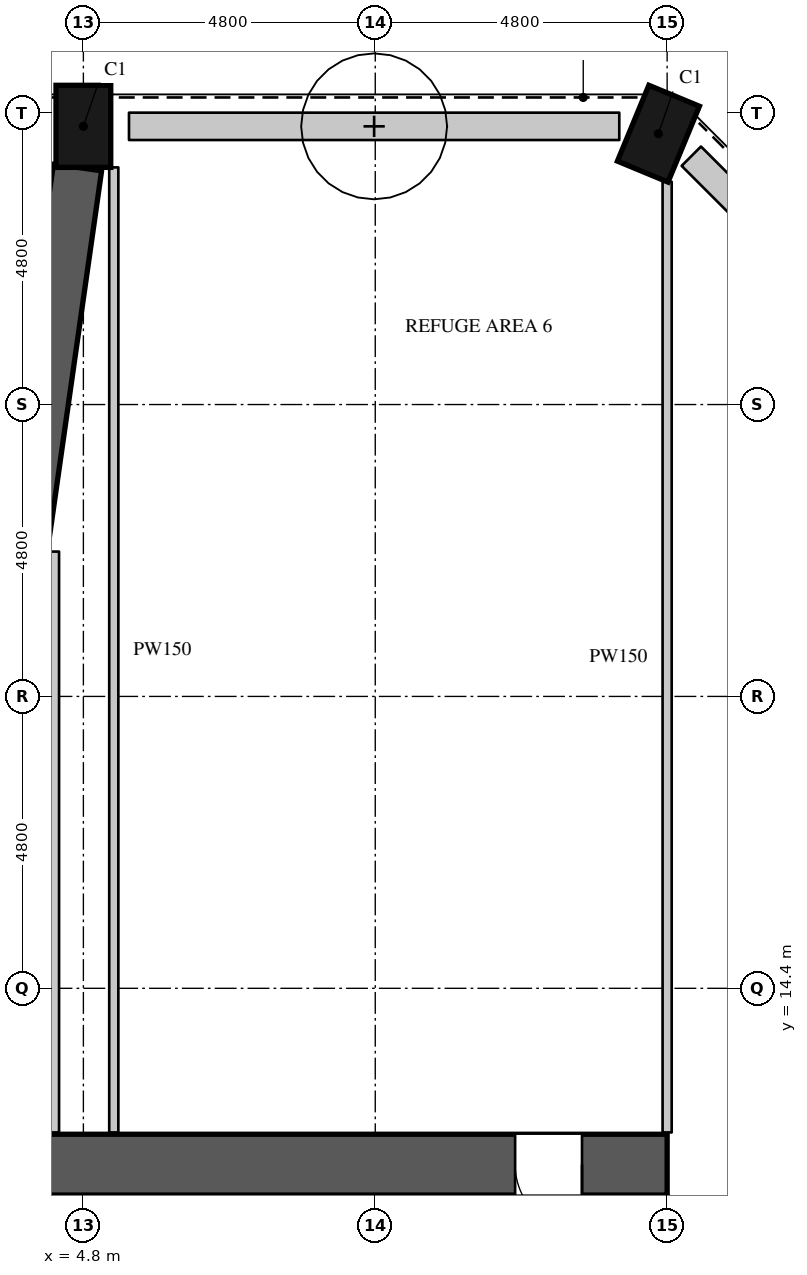
"""IFC4 building model, lengths in metres.
Left out: names, types, materials, properties, quantities, classifications, styles, units other than length and angle.
Written with IfcOpenShell. Run it as: python <this file> out.ifc"""

import sys

from ifc_helpers import new_model, si_unit, direction, frame, frame_2d, origin, origin_2d, place, context, subcontext, project, spatial, rectangle, extrude, element, fill, save


model = new_model("IFC4")
c1 = context("Model", 3, precision=1e-05, world=origin(), true_north=direction((0.0, 1.0)))
c2 = subcontext(c1, "Body", "Model", "MODEL_VIEW")
j1 = project(units=[si_unit("LENGTHUNIT", "METRE"), si_unit("PLANEANGLEUNIT", "RADIAN")], contexts=[c1])
p1 = place(None, origin())
s1 = spatial("IfcSite", under=j1, at=p1, CompositionType="ELEMENT")
p2 = place(p1, origin())
s2 = spatial("IfcBuilding", under=s1, at=p2, CompositionType="ELEMENT")
p3 = place(p2, frame((0.0, 0.0, 101.1)))
s3 = spatial("IfcBuildingStorey", under=s2, at=p3, CompositionType="ELEMENT", Elevation=101.1)
for number, where, z_axis, x_axis in (
    (1, (14.257, 28.454, 0.0), (0.0, 0.0, 1.0), (-0.924, 0.383, 0.0)),
    (2, (4.8, 28.575, 0.0), (0.0, 0.0, 1.0), (-1.0, 0.0, 0.0)),
):
    element("IfcColumn", number, at=place(p3, frame(where, z_axis=z_axis, x_axis=x_axis)), inside=s3, PredefinedType="COLUMN", context=c2, shape_type="SweptSolid", body=[
        extrude(rectangle(XDim=0.9, YDim=1.35, at=origin_2d()), origin(), (0.0, 0.0, 1.0), 5.4),
    ])
p4 = place(p3, frame((2.621, 13.287, 0.0), z_axis=(0.0, 0.0, 1.0), x_axis=(0.141104108698, 0.989994762869, 0.0)))
e3 = element("IfcWall", 3, at=p4, inside=s3, PredefinedType="SHEAR", context=c2, shape_type="SweptSolid", body=[
    extrude(rectangle(XDim=14.76, YDim=0.8, at=frame_2d((7.38, 0.0))), origin(), (0.0, 0.0, 1.0), 3.15),
])
p5 = place(p3, frame((20.911, 21.971, 0.0), z_axis=(0.0, 0.0, 1.0), x_axis=(-0.707106781187, 0.707106781187, 0.0)))
e4 = element("IfcWall", 4, at=p5, inside=s3, PredefinedType="USERDEFINED", context=c2, shape_type="SweptSolid", body=[
    extrude(rectangle(XDim=8.646, YDim=0.45, at=frame_2d((4.323, 0.0))), origin(), (0.0, 0.0, 1.0), 0.9),
])
p6 = place(p3, frame((13.613, 28.575, 0.0), z_axis=(0.0, 0.0, 1.0), x_axis=(-1.0, 0.0, 0.0)))
e5 = element("IfcWall", 5, at=p6, inside=s3, PredefinedType="USERDEFINED", context=c2, shape_type="SweptSolid", body=[
    extrude(rectangle(XDim=8.063, YDim=0.45, at=frame_2d((4.031, 0.0))), origin(), (0.0, 0.0, 1.0), 0.9),
])
p7 = place(p3, frame((-14.4, 11.5, 0.0), z_axis=(0.0, 0.0, 1.0), x_axis=(1.0, 0.0, 0.0)))
e6 = element("IfcWall", 6, at=p7, inside=s3, PredefinedType="SHEAR", context=c2, shape_type="SweptSolid", body=[
    extrude(rectangle(XDim=28.8, YDim=1.0, at=frame_2d((14.4, 0.0))), origin(), (0.0, 0.0, 1.0), 5.4),
])
p8 = place(p7, frame((1.4, 0.0, 0.0)))
e7 = element("IfcOpeningElement", 7, at=p8, cuts=e6, PredefinedType="OPENING", context=c2, shape_type="SweptSolid", body=[
    extrude(rectangle(XDim=1.1, YDim=2.2, at=frame_2d((0.55, 1.1))), frame((0.0, 0.51, 0.0), z_axis=(0.0, -1.0, 0.0), x_axis=(1.0, 0.0, 0.0)), (0.0, 0.0, 1.0), 1.02),
])
p9 = place(p7, frame((26.3, 0.0, 0.0)))
e8 = element("IfcOpeningElement", 8, at=p9, cuts=e6, PredefinedType="OPENING", context=c2, shape_type="SweptSolid", body=[
    extrude(rectangle(XDim=1.1, YDim=2.2, at=frame_2d((0.55, 1.1))), frame((0.0, 0.51, 0.0), z_axis=(0.0, -1.0, 0.0), x_axis=(1.0, 0.0, 0.0)), (0.0, 0.0, 1.0), 1.02),
])
p10 = place(p7, frame((11.2, 0.0, 0.0)))
e9 = element("IfcOpeningElement", 9, at=p10, cuts=e6, PredefinedType="OPENING", context=c2, shape_type="SweptSolid", body=[
    extrude(rectangle(XDim=1.8, YDim=2.4, at=frame_2d((0.9, 1.2))), frame((0.0, 0.51, 0.0), z_axis=(0.0, -1.0, 0.0), x_axis=(1.0, 0.0, 0.0)), (0.0, 0.0, 1.0), 1.02),
])
p11 = place(p3, frame((5.3, 12.03, 0.0), z_axis=(0.0, 0.0, 1.0), x_axis=(0.0, 1.0, 0.0)))
e10 = element("IfcWall", 10, at=p11, inside=s3, PredefinedType="PARTITIONING", context=c2, shape_type="SweptSolid", body=[
    extrude(rectangle(XDim=15.87, YDim=0.15, at=frame_2d((7.935, 0.0))), origin(), (0.0, 0.0, 1.0), 5.15),
])
p12 = place(p3, frame((14.4, 12.03, 0.0), z_axis=(0.0, 0.0, 1.0), x_axis=(0.0, 1.0, 0.0)))
e11 = element("IfcWall", 11, at=p12, inside=s3, PredefinedType="PARTITIONING", context=c2, shape_type="SweptSolid", body=[
    extrude(rectangle(XDim=15.634, YDim=0.15, at=frame_2d((7.817, 0.0))), origin(), (0.0, 0.0, 1.0), 5.15),
])
p13 = place(p3, frame((4.3, 12.03, 0.0), z_axis=(0.0, 0.0, 1.0), x_axis=(0.0, 1.0, 0.0)))
e12 = element("IfcWall", 12, at=p13, inside=s3, PredefinedType="PARTITIONING", context=c2, shape_type="SweptSolid", body=[
    extrude(rectangle(XDim=9.552, YDim=0.2, at=frame_2d((4.776, 0.0))), origin(), (0.0, 0.0, 1.0), 5.15),
])
p14 = place(p9, origin())
e13 = element("IfcDoor", 13, at=p14, inside=s3, OperationType="SINGLE_SWING_LEFT", PredefinedType="DOOR", context=c2, shape_type="SweptSolid", body=[
    extrude(rectangle(XDim=1.1, YDim=2.2, at=frame_2d((0.55, 1.1))), frame((0.0, -0.445, 0.0), z_axis=(0.0, -1.0, 0.0), x_axis=(1.0, 0.0, 0.0)), (0.0, 0.0, 1.0), 0.05),
])
fill(e8, e13)
save(model, sys.argv[1])
